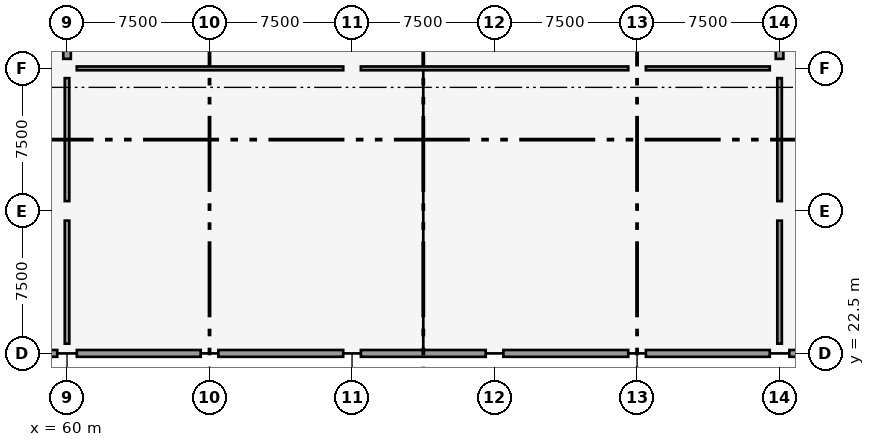
"""IFC4 building model, lengths in metres.
Left out: names, types, materials, properties, quantities, classifications, styles, units other than length and angle.
Written with IfcOpenShell. Run it as: python <this file> out.ifc"""

import sys

from ifc_helpers import new_model, si_unit, direction, frame, frame_2d, origin, origin_2d, place, context, subcontext, project, spatial, rectangle, extrude, element, fill, save


model = new_model("IFC4")
c1 = context("Model", 3, precision=1e-05, world=origin(), true_north=direction((0.0, 1.0)))
c2 = subcontext(c1, "Body", "Model", "MODEL_VIEW")
j1 = project(units=[si_unit("LENGTHUNIT", "METRE"), si_unit("PLANEANGLEUNIT", "RADIAN")], contexts=[c1])
p1 = place(None, origin())
s1 = spatial("IfcSite", under=j1, at=p1, CompositionType="ELEMENT")
p2 = place(p1, origin())
s2 = spatial("IfcBuilding", under=s1, at=p2, CompositionType="ELEMENT")
p3 = place(p2, origin())
s3 = spatial("IfcBuildingStorey", under=s2, at=p3, CompositionType="ELEMENT", Elevation=0.0)
for number, where, z_axis, x_axis in (
    (1, (60.0, 22.5, 0.0), (0.0, 0.0, 1.0), (1.0, 0.0, 0.0)),
    (2, (60.0, 30.0, 0.0), (0.0, 0.0, 1.0), (1.0, 0.0, 0.0)),
    (3, (60.0, 37.5, 0.0), (0.0, 0.0, 1.0), (1.0, 0.0, 0.0)),
):
    element("IfcColumn", number, at=place(p3, frame(where, z_axis=z_axis, x_axis=x_axis)), inside=s3, PredefinedType="COLUMN", context=c2, shape_type="SweptSolid", body=[
        extrude(rectangle(XDim=1.0, YDim=1.0, at=origin_2d()), origin(), (0.0, 0.0, 1.0), 4.8),
    ])
for number, where, z_axis, x_axis in (
    (4, (67.5, 22.5, 0.0), (0.0, 0.0, 1.0), (1.0, 0.0, 0.0)),
    (5, (67.5, 30.0, 0.0), (0.0, 0.0, 1.0), (1.0, 0.0, 0.0)),
    (6, (75.0, 22.5, 0.0), (0.0, 0.0, 1.0), (1.0, 0.0, 0.0)),
    (7, (75.0, 30.0, 0.0), (0.0, 0.0, 1.0), (1.0, 0.0, 0.0)),
    (8, (75.0, 37.5, 0.0), (0.0, 0.0, 1.0), (1.0, 0.0, 0.0)),
    (9, (82.5, 22.5, 0.0), (0.0, 0.0, 1.0), (1.0, 0.0, 0.0)),
    (10, (82.5, 30.0, 0.0), (0.0, 0.0, 1.0), (1.0, 0.0, 0.0)),
    (11, (90.0, 22.5, 0.0), (0.0, 0.0, 1.0), (1.0, 0.0, 0.0)),
    (12, (90.0, 30.0, 0.0), (0.0, 0.0, 1.0), (1.0, 0.0, 0.0)),
    (13, (90.0, 37.5, 0.0), (0.0, 0.0, 1.0), (1.0, 0.0, 0.0)),
):
    element("IfcColumn", number, at=place(p3, frame(where, z_axis=z_axis, x_axis=x_axis)), inside=s3, PredefinedType="COLUMN", context=c2, shape_type="SweptSolid", body=[
        extrude(rectangle(XDim=0.9, YDim=0.9, at=origin_2d()), origin(), (0.0, 0.0, 1.0), 4.8),
    ])
for number, where, z_axis, x_axis in (
    (14, (97.5, 22.5, 0.0), (0.0, 0.0, 1.0), (1.0, 0.0, 0.0)),
    (15, (97.5, 30.0, 0.0), (0.0, 0.0, 1.0), (1.0, 0.0, 0.0)),
    (16, (97.5, 37.5, 0.0), (0.0, 0.0, 1.0), (1.0, 0.0, 0.0)),
):
    element("IfcColumn", number, at=place(p3, frame(where, z_axis=z_axis, x_axis=x_axis)), inside=s3, PredefinedType="COLUMN", context=c2, shape_type="SweptSolid", body=[
        extrude(rectangle(XDim=1.0, YDim=1.0, at=origin_2d()), origin(), (0.0, 0.0, 1.0), 4.8),
    ])
p4 = place(p3, frame((60.0, 38.0, 0.0), z_axis=(0.0, 0.0, 1.0), x_axis=(0.0, 1.0, 0.0)))
e17 = element("IfcWall", 17, at=p4, inside=s3, PredefinedType="SHEAR", context=c2, shape_type="SweptSolid", body=[
    extrude(rectangle(XDim=6.5, YDim=0.4, at=frame_2d((3.25, 0.0))), origin(), (0.0, 0.0, 1.0), 3.0),
])
p5 = place(p3, frame((97.5, 38.0, 0.0), z_axis=(0.0, 0.0, 1.0), x_axis=(0.0, 1.0, 0.0)))
e18 = element("IfcWall", 18, at=p5, inside=s3, PredefinedType="SHEAR", context=c2, shape_type="SweptSolid", body=[
    extrude(rectangle(XDim=6.5, YDim=0.4, at=frame_2d((3.25, 0.0))), origin(), (0.0, 0.0, 1.0), 3.6),
])
p6 = place(p3, frame((53.015, 22.5, 0.0), z_axis=(0.0, 0.0, 1.0), x_axis=(1.0, 0.0, 0.0)))
e19 = element("IfcWall", 19, at=p6, inside=s3, PredefinedType="SOLIDWALL", context=c2, shape_type="SweptSolid", body=[
    extrude(rectangle(XDim=6.47, YDim=0.36, at=frame_2d((3.235, 0.0))), origin(), (0.0, 0.0, 1.0), 3.72),
])
p7 = place(p6, frame((2.235, 0.0, 0.0)))
e20 = element("IfcOpeningElement", 20, at=p7, cuts=e19, PredefinedType="OPENING", context=c2, shape_type="SweptSolid", body=[
    extrude(rectangle(XDim=2.0, YDim=2.2, at=frame_2d((1.0, 1.1))), frame((0.0, 0.19, 0.0), z_axis=(0.0, -1.0, 0.0), x_axis=(1.0, 0.0, 0.0)), (0.0, 0.0, 1.0), 0.38),
])
p8 = place(p3, frame((60.515, 22.5, 0.0), z_axis=(0.0, 0.0, 1.0), x_axis=(1.0, 0.0, 0.0)))
e21 = element("IfcWall", 21, at=p8, inside=s3, PredefinedType="SOLIDWALL", context=c2, shape_type="SweptSolid", body=[
    extrude(rectangle(XDim=6.52, YDim=0.36, at=frame_2d((3.26, 0.0))), origin(), (0.0, 0.0, 1.0), 3.72),
])
p9 = place(p8, frame((2.235, 0.0, 0.0)))
e22 = element("IfcOpeningElement", 22, at=p9, cuts=e21, PredefinedType="OPENING", context=c2, shape_type="SweptSolid", body=[
    extrude(rectangle(XDim=2.0, YDim=2.2, at=frame_2d((1.0, 1.1))), frame((0.0, 0.19, 0.0), z_axis=(0.0, -1.0, 0.0), x_axis=(1.0, 0.0, 0.0)), (0.0, 0.0, 1.0), 0.38),
])
p10 = place(p3, frame((67.965, 22.5, 0.0), z_axis=(0.0, 0.0, 1.0), x_axis=(1.0, 0.0, 0.0)))
e23 = element("IfcWall", 23, at=p10, inside=s3, PredefinedType="SOLIDWALL", context=c2, shape_type="SweptSolid", body=[
    extrude(rectangle(XDim=6.57, YDim=0.36, at=frame_2d((3.285, 0.0))), origin(), (0.0, 0.0, 1.0), 3.72),
])
p11 = place(p10, frame((2.285, 0.0, 0.0)))
e24 = element("IfcOpeningElement", 24, at=p11, cuts=e23, PredefinedType="OPENING", context=c2, shape_type="SweptSolid", body=[
    extrude(rectangle(XDim=2.0, YDim=2.2, at=frame_2d((1.0, 1.1))), frame((0.0, 0.19, 0.0), z_axis=(0.0, -1.0, 0.0), x_axis=(1.0, 0.0, 0.0)), (0.0, 0.0, 1.0), 0.38),
])
p12 = place(p3, frame((75.465, 22.5, 0.0), z_axis=(0.0, 0.0, 1.0), x_axis=(1.0, 0.0, 0.0)))
e25 = element("IfcWall", 25, at=p12, inside=s3, PredefinedType="SOLIDWALL", context=c2, shape_type="SweptSolid", body=[
    extrude(rectangle(XDim=6.57, YDim=0.36, at=frame_2d((3.285, 0.0))), origin(), (0.0, 0.0, 1.0), 3.72),
])
p13 = place(p12, frame((2.285, 0.0, 0.0)))
e26 = element("IfcOpeningElement", 26, at=p13, cuts=e25, PredefinedType="OPENING", context=c2, shape_type="SweptSolid", body=[
    extrude(rectangle(XDim=2.0, YDim=2.2, at=frame_2d((1.0, 1.1))), frame((0.0, 0.19, 0.0), z_axis=(0.0, -1.0, 0.0), x_axis=(1.0, 0.0, 0.0)), (0.0, 0.0, 1.0), 0.38),
])
p14 = place(p3, frame((82.965, 22.5, 0.0), z_axis=(0.0, 0.0, 1.0), x_axis=(1.0, 0.0, 0.0)))
e27 = element("IfcWall", 27, at=p14, inside=s3, PredefinedType="SOLIDWALL", context=c2, shape_type="SweptSolid", body=[
    extrude(rectangle(XDim=6.57, YDim=0.36, at=frame_2d((3.285, 0.0))), origin(), (0.0, 0.0, 1.0), 3.72),
])
p15 = place(p14, frame((2.285, 0.0, 0.0)))
e28 = element("IfcOpeningElement", 28, at=p15, cuts=e27, PredefinedType="OPENING", context=c2, shape_type="SweptSolid", body=[
    extrude(rectangle(XDim=2.0, YDim=2.2, at=frame_2d((1.0, 1.1))), frame((0.0, 0.19, 0.0), z_axis=(0.0, -1.0, 0.0), x_axis=(1.0, 0.0, 0.0)), (0.0, 0.0, 1.0), 0.38),
])
p16 = place(p3, frame((90.465, 22.5, 0.0), z_axis=(0.0, 0.0, 1.0), x_axis=(1.0, 0.0, 0.0)))
e29 = element("IfcWall", 29, at=p16, inside=s3, PredefinedType="SOLIDWALL", context=c2, shape_type="SweptSolid", body=[
    extrude(rectangle(XDim=6.52, YDim=0.36, at=frame_2d((3.26, 0.0))), origin(), (0.0, 0.0, 1.0), 3.72),
])
p17 = place(p16, frame((2.285, 0.0, 0.0)))
e30 = element("IfcOpeningElement", 30, at=p17, cuts=e29, PredefinedType="OPENING", context=c2, shape_type="SweptSolid", body=[
    extrude(rectangle(XDim=2.0, YDim=2.2, at=frame_2d((1.0, 1.1))), frame((0.0, 0.19, 0.0), z_axis=(0.0, -1.0, 0.0), x_axis=(1.0, 0.0, 0.0)), (0.0, 0.0, 1.0), 0.38),
])
p18 = place(p3, frame((98.015, 22.5, 0.0), z_axis=(0.0, 0.0, 1.0), x_axis=(1.0, 0.0, 0.0)))
e31 = element("IfcWall", 31, at=p18, inside=s3, PredefinedType="SOLIDWALL", context=c2, shape_type="SweptSolid", body=[
    extrude(rectangle(XDim=6.47, YDim=0.36, at=frame_2d((3.235, 0.0))), origin(), (0.0, 0.0, 1.0), 3.72),
])
p19 = place(p18, frame((2.235, 0.0, 0.0)))
e32 = element("IfcOpeningElement", 32, at=p19, cuts=e31, PredefinedType="OPENING", context=c2, shape_type="SweptSolid", body=[
    extrude(rectangle(XDim=2.0, YDim=2.2, at=frame_2d((1.0, 1.1))), frame((0.0, 0.19, 0.0), z_axis=(0.0, -1.0, 0.0), x_axis=(1.0, 0.0, 0.0)), (0.0, 0.0, 1.0), 0.38),
])
p20 = place(p3, frame((60.514, 37.5, 0.0), z_axis=(0.0, 0.0, 1.0), x_axis=(1.0, 0.0, 0.0)))
e33 = element("IfcWall", 33, at=p20, inside=s3, PredefinedType="PARTITIONING", context=c2, shape_type="SweptSolid", body=[
    extrude(rectangle(XDim=14.022, YDim=0.2, at=frame_2d((7.011, 0.0))), origin(), (0.0, 0.0, 1.0), 2.97),
])
p21 = place(p20, frame((2.336, 0.0, 0.0)))
e34 = element("IfcOpeningElement", 34, at=p21, cuts=e33, PredefinedType="OPENING", context=c2, shape_type="SweptSolid", body=[
    extrude(rectangle(XDim=1.8, YDim=2.18, at=frame_2d((0.9, 1.09))), frame((0.0, 0.11, 0.0), z_axis=(0.0, -1.0, 0.0), x_axis=(1.0, 0.0, 0.0)), (0.0, 0.0, 1.0), 0.22),
])
p22 = place(p3, frame((75.464, 37.5, 0.0), z_axis=(0.0, 0.0, 1.0), x_axis=(1.0, 0.0, 0.0)))
e35 = element("IfcWall", 35, at=p22, inside=s3, PredefinedType="PARTITIONING", context=c2, shape_type="SweptSolid", body=[
    extrude(rectangle(XDim=14.072, YDim=0.2, at=frame_2d((7.036, 0.0))), origin(), (0.0, 0.0, 1.0), 2.97),
])
p23 = place(p3, frame((90.464, 37.5, 0.0), z_axis=(0.0, 0.0, 1.0), x_axis=(1.0, 0.0, 0.0)))
e36 = element("IfcWall", 36, at=p23, inside=s3, PredefinedType="PARTITIONING", context=c2, shape_type="SweptSolid", body=[
    extrude(rectangle(XDim=6.522, YDim=0.2, at=frame_2d((3.261, 0.0))), origin(), (0.0, 0.0, 1.0), 2.97),
])
p24 = place(p23, frame((2.386, 0.0, 0.0)))
e37 = element("IfcOpeningElement", 37, at=p24, cuts=e36, PredefinedType="OPENING", context=c2, shape_type="SweptSolid", body=[
    extrude(rectangle(XDim=1.8, YDim=2.18, at=frame_2d((0.9, 1.09))), frame((0.0, 0.11, 0.0), z_axis=(0.0, -1.0, 0.0), x_axis=(1.0, 0.0, 0.0)), (0.0, 0.0, 1.0), 0.22),
])
p25 = place(p3, frame((60.0, 23.014, 0.0), z_axis=(0.0, 0.0, 1.0), x_axis=(0.0, 1.0, 0.0)))
e38 = element("IfcWall", 38, at=p25, inside=s3, PredefinedType="PARTITIONING", context=c2, shape_type="SweptSolid", body=[
    extrude(rectangle(XDim=6.472, YDim=0.24, at=frame_2d((3.236, 0.0))), origin(), (0.0, 0.0, 1.0), 3.42),
])
p26 = place(p25, frame((2.486, 0.0, 0.0)))
e39 = element("IfcOpeningElement", 39, at=p26, cuts=e38, PredefinedType="OPENING", context=c2, shape_type="SweptSolid", body=[
    extrude(rectangle(XDim=1.5, YDim=2.16, at=frame_2d((0.75, 1.08))), frame((0.0, 0.13, 0.0), z_axis=(0.0, -1.0, 0.0), x_axis=(1.0, 0.0, 0.0)), (0.0, 0.0, 1.0), 0.26),
])
p27 = place(p3, frame((60.0, 30.514, 0.0), z_axis=(0.0, 0.0, 1.0), x_axis=(0.0, 1.0, 0.0)))
e40 = element("IfcWall", 40, at=p27, inside=s3, PredefinedType="PARTITIONING", context=c2, shape_type="SweptSolid", body=[
    extrude(rectangle(XDim=6.472, YDim=0.24, at=frame_2d((3.236, 0.0))), origin(), (0.0, 0.0, 1.0), 2.97),
])
p28 = place(p27, frame((2.336, 0.0, 0.0)))
e41 = element("IfcOpeningElement", 41, at=p28, cuts=e40, PredefinedType="OPENING", context=c2, shape_type="SweptSolid", body=[
    extrude(rectangle(XDim=1.8, YDim=2.16, at=frame_2d((0.9, 1.08))), frame((0.0, 0.13, 0.0), z_axis=(0.0, -1.0, 0.0), x_axis=(1.0, 0.0, 0.0)), (0.0, 0.0, 1.0), 0.26),
])
p29 = place(p3, frame((97.5, 23.014, 0.0), z_axis=(0.0, 0.0, 1.0), x_axis=(0.0, 1.0, 0.0)))
e42 = element("IfcWall", 42, at=p29, inside=s3, PredefinedType="PARTITIONING", context=c2, shape_type="SweptSolid", body=[
    extrude(rectangle(XDim=6.472, YDim=0.24, at=frame_2d((3.236, 0.0))), origin(), (0.0, 0.0, 1.0), 3.57),
])
p30 = place(p29, frame((2.486, 0.0, 0.0)))
e43 = element("IfcOpeningElement", 43, at=p30, cuts=e42, PredefinedType="OPENING", context=c2, shape_type="SweptSolid", body=[
    extrude(rectangle(XDim=1.5, YDim=2.16, at=frame_2d((0.75, 1.08))), frame((0.0, 0.13, 0.0), z_axis=(0.0, -1.0, 0.0), x_axis=(1.0, 0.0, 0.0)), (0.0, 0.0, 1.0), 0.26),
])
p31 = place(p3, frame((97.5, 30.514, 0.0), z_axis=(0.0, 0.0, 1.0), x_axis=(0.0, 1.0, 0.0)))
e44 = element("IfcWall", 44, at=p31, inside=s3, PredefinedType="PARTITIONING", context=c2, shape_type="SweptSolid", body=[
    extrude(rectangle(XDim=6.472, YDim=0.24, at=frame_2d((3.236, 0.0))), origin(), (0.0, 0.0, 1.0), 3.57),
])
p32 = place(p31, frame((2.336, 0.0, 0.0)))
e45 = element("IfcOpeningElement", 45, at=p32, cuts=e44, PredefinedType="OPENING", context=c2, shape_type="SweptSolid", body=[
    extrude(rectangle(XDim=1.8, YDim=2.16, at=frame_2d((0.9, 1.08))), frame((0.0, 0.13, 0.0), z_axis=(0.0, -1.0, 0.0), x_axis=(1.0, 0.0, 0.0)), (0.0, 0.0, 1.0), 0.26),
])
p33 = place(p9, frame((2.0, 0.0, 0.0), z_axis=(0.0, 0.0, 1.0), x_axis=(-1.0, 0.0, 0.0)))
e46 = element("IfcDoor", 46, at=p33, inside=s3, OperationType="SINGLE_SWING_RIGHT", PredefinedType="DOOR", context=c2, shape_type="SweptSolid", body=[
    extrude(rectangle(XDim=2.0, YDim=2.2, at=frame_2d((1.0, 1.1))), frame((0.0, 0.025, 0.0), z_axis=(0.0, -1.0, 0.0), x_axis=(1.0, 0.0, 0.0)), (0.0, 0.0, 1.0), 0.05),
])
fill(e22, e46)
p34 = place(p11, frame((2.0, 0.0, 0.0), z_axis=(0.0, 0.0, 1.0), x_axis=(-1.0, 0.0, 0.0)))
e47 = element("IfcDoor", 47, at=p34, inside=s3, OperationType="SINGLE_SWING_LEFT", PredefinedType="DOOR", context=c2, shape_type="SweptSolid", body=[
    extrude(rectangle(XDim=2.0, YDim=2.2, at=frame_2d((1.0, 1.1))), frame((0.0, 0.025, 0.0), z_axis=(0.0, -1.0, 0.0), x_axis=(1.0, 0.0, 0.0)), (0.0, 0.0, 1.0), 0.05),
])
fill(e24, e47)
p35 = place(p13, frame((2.0, 0.0, 0.0), z_axis=(0.0, 0.0, 1.0), x_axis=(-1.0, 0.0, 0.0)))
e48 = element("IfcDoor", 48, at=p35, inside=s3, OperationType="SINGLE_SWING_RIGHT", PredefinedType="DOOR", context=c2, shape_type="SweptSolid", body=[
    extrude(rectangle(XDim=2.0, YDim=2.2, at=frame_2d((1.0, 1.1))), frame((0.0, 0.025, 0.0), z_axis=(0.0, -1.0, 0.0), x_axis=(1.0, 0.0, 0.0)), (0.0, 0.0, 1.0), 0.05),
])
fill(e26, e48)
p36 = place(p15, frame((2.0, 0.0, 0.0), z_axis=(0.0, 0.0, 1.0), x_axis=(-1.0, 0.0, 0.0)))
e49 = element("IfcDoor", 49, at=p36, inside=s3, OperationType="SINGLE_SWING_LEFT", PredefinedType="DOOR", context=c2, shape_type="SweptSolid", body=[
    extrude(rectangle(XDim=2.0, YDim=2.2, at=frame_2d((1.0, 1.1))), frame((0.0, 0.025, 0.0), z_axis=(0.0, -1.0, 0.0), x_axis=(1.0, 0.0, 0.0)), (0.0, 0.0, 1.0), 0.05),
])
fill(e28, e49)
p37 = place(p17, frame((2.0, 0.0, 0.0), z_axis=(0.0, 0.0, 1.0), x_axis=(-1.0, 0.0, 0.0)))
e50 = element("IfcDoor", 50, at=p37, inside=s3, OperationType="SINGLE_SWING_RIGHT", PredefinedType="DOOR", context=c2, shape_type="SweptSolid", body=[
    extrude(rectangle(XDim=2.0, YDim=2.2, at=frame_2d((1.0, 1.1))), frame((0.0, 0.025, 0.0), z_axis=(0.0, -1.0, 0.0), x_axis=(1.0, 0.0, 0.0)), (0.0, 0.0, 1.0), 0.05),
])
fill(e30, e50)
p38 = place(p21, origin())
e51 = element("IfcDoor", 51, at=p38, inside=s3, OperationType="SINGLE_SWING_RIGHT", PredefinedType="DOOR", context=c2, shape_type="SweptSolid", body=[
    extrude(rectangle(XDim=1.8, YDim=2.18, at=frame_2d((0.9, 1.09))), frame((0.0, 0.025, 0.0), z_axis=(0.0, -1.0, 0.0), x_axis=(1.0, 0.0, 0.0)), (0.0, 0.0, 1.0), 0.05),
])
fill(e34, e51)
p39 = place(p24, origin())
e52 = element("IfcDoor", 52, at=p39, inside=s3, OperationType="SINGLE_SWING_LEFT", PredefinedType="DOOR", context=c2, shape_type="SweptSolid", body=[
    extrude(rectangle(XDim=1.8, YDim=2.18, at=frame_2d((0.9, 1.09))), frame((0.0, 0.025, 0.0), z_axis=(0.0, -1.0, 0.0), x_axis=(1.0, 0.0, 0.0)), (0.0, 0.0, 1.0), 0.05),
])
fill(e37, e52)
p40 = place(p26, origin())
e53 = element("IfcDoor", 53, at=p40, inside=s3, OperationType="SINGLE_SWING_RIGHT", PredefinedType="DOOR", context=c2, shape_type="SweptSolid", body=[
    extrude(rectangle(XDim=1.5, YDim=2.16, at=frame_2d((0.75, 1.08))), frame((0.0, 0.025, 0.0), z_axis=(0.0, -1.0, 0.0), x_axis=(1.0, 0.0, 0.0)), (0.0, 0.0, 1.0), 0.05),
])
fill(e39, e53)
p41 = place(p28, origin())
e54 = element("IfcDoor", 54, at=p41, inside=s3, OperationType="SINGLE_SWING_LEFT", PredefinedType="DOOR", context=c2, shape_type="SweptSolid", body=[
    extrude(rectangle(XDim=1.8, YDim=2.16, at=frame_2d((0.9, 1.08))), frame((0.0, 0.025, 0.0), z_axis=(0.0, -1.0, 0.0), x_axis=(1.0, 0.0, 0.0)), (0.0, 0.0, 1.0), 0.05),
])
fill(e41, e54)
p42 = place(p30, origin())
e55 = element("IfcDoor", 55, at=p42, inside=s3, OperationType="SINGLE_SWING_RIGHT", PredefinedType="DOOR", context=c2, shape_type="SweptSolid", body=[
    extrude(rectangle(XDim=1.5, YDim=2.16, at=frame_2d((0.75, 1.08))), frame((0.0, 0.025, 0.0), z_axis=(0.0, -1.0, 0.0), x_axis=(1.0, 0.0, 0.0)), (0.0, 0.0, 1.0), 0.05),
])
fill(e43, e55)
p43 = place(p32, origin())
e56 = element("IfcDoor", 56, at=p43, inside=s3, OperationType="SINGLE_SWING_LEFT", PredefinedType="DOOR", context=c2, shape_type="SweptSolid", body=[
    extrude(rectangle(XDim=1.8, YDim=2.16, at=frame_2d((0.9, 1.08))), frame((0.0, 0.025, 0.0), z_axis=(0.0, -1.0, 0.0), x_axis=(1.0, 0.0, 0.0)), (0.0, 0.0, 1.0), 0.05),
])
fill(e45, e56)
save(model, sys.argv[1])
